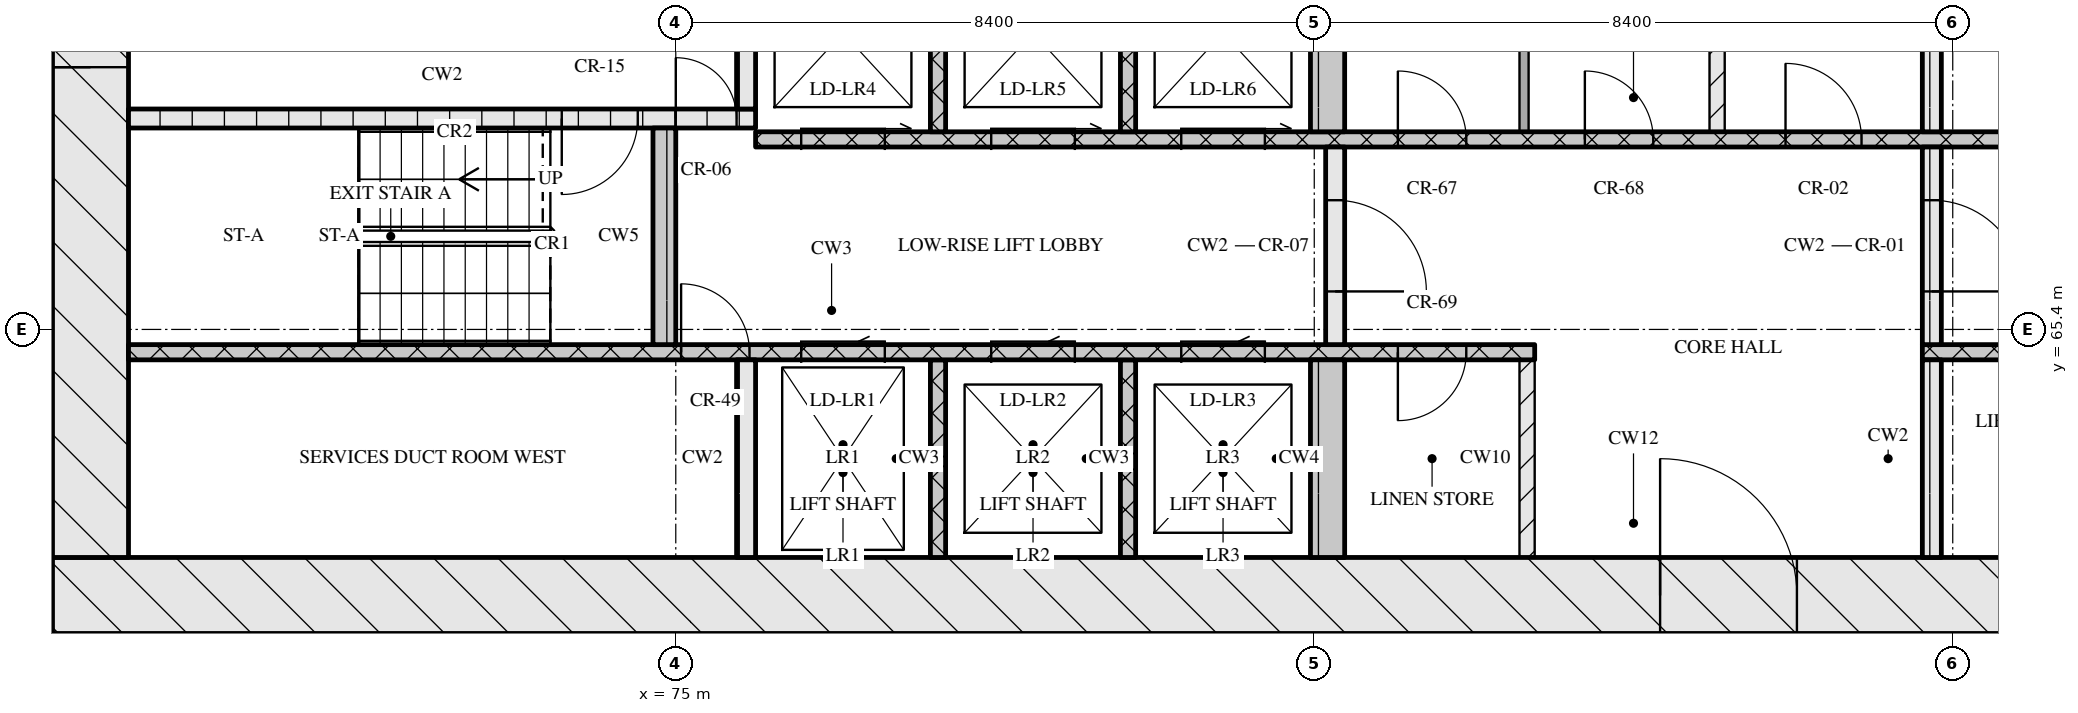
"""IFC4 building model, lengths in metres.
Left out: names, types, materials, properties, quantities, classifications, styles, units other than length and angle.
Written with IfcOpenShell. Run it as: python <this file> out.ifc"""

import sys

from ifc_helpers import new_model, si_unit, direction, frame, frame_2d, origin, place, context, subcontext, project, spatial, rectangle, extrude, element, fill, save


model = new_model("IFC4")
c1 = context("Model", 3, precision=1e-05, world=origin(), true_north=direction((0.0, 1.0)))
c2 = subcontext(c1, "Body", "Model", "MODEL_VIEW")
j1 = project(units=[si_unit("LENGTHUNIT", "METRE"), si_unit("PLANEANGLEUNIT", "RADIAN")], contexts=[c1])
p1 = place(None, origin())
s1 = spatial("IfcSite", under=j1, at=p1, CompositionType="ELEMENT")
p2 = place(p1, origin())
s2 = spatial("IfcBuilding", under=s1, at=p2, CompositionType="ELEMENT")
p3 = place(p2, frame((0.0, 0.0, 131.25)))
s3 = spatial("IfcBuildingStorey", under=s2, at=p3, CompositionType="ELEMENT", Elevation=131.25)
p4 = place(p3, frame((66.8, 61.9, 0.0), z_axis=(0.0, 0.0, 1.0), x_axis=(1.0, 0.0, 0.0)))
e1 = element("IfcWall", 1, at=p4, inside=s3, PredefinedType="SOLIDWALL", context=c2, shape_type="SweptSolid", body=[
    extrude(rectangle(XDim=41.6, YDim=1.0, at=frame_2d((20.8, 0.0))), origin(), (0.0, 0.0, 1.0), 3.32),
])
p5 = place(p4, frame((21.15, 0.0, 0.0)))
e2 = element("IfcOpeningElement", 2, at=p5, cuts=e1, PredefinedType="OPENING", context=c2, shape_type="SweptSolid", body=[
    extrude(rectangle(XDim=1.8, YDim=2.1, at=frame_2d((0.9, 1.05))), frame((0.0, 0.51, 0.0), z_axis=(0.0, -1.0, 0.0), x_axis=(1.0, 0.0, 0.0)), (0.0, 0.0, 1.0), 1.02),
])
p6 = place(p3, frame((67.3, 62.4, 0.0), z_axis=(0.0, 0.0, 1.0), x_axis=(0.0, 1.0, 0.0)))
e3 = element("IfcWall", 3, at=p6, inside=s3, PredefinedType="SOLIDWALL", context=c2, shape_type="SweptSolid", body=[
    extrude(rectangle(XDim=12.0, YDim=1.0, at=frame_2d((6.0, 0.0))), origin(), (0.0, 0.0, 1.0), 3.32),
])
p7 = place(p6, frame((6.45, 0.0, 0.0)))
e4 = element("IfcOpeningElement", 4, at=p7, cuts=e3, PredefinedType="OPENING", context=c2, shape_type="SweptSolid", body=[
    extrude(rectangle(XDim=1.2, YDim=2.1, at=frame_2d((0.6, 1.05))), frame((0.0, 0.51, 0.0), z_axis=(0.0, -1.0, 0.0), x_axis=(1.0, 0.0, 0.0)), (0.0, 0.0, 1.0), 1.02),
])
p8 = place(p3, frame((75.925, 62.4, 0.0), z_axis=(0.0, 0.0, 1.0), x_axis=(0.0, 1.0, 0.0)))
e5 = element("IfcWall", 5, at=p8, inside=s3, PredefinedType="SOLIDWALL", context=c2, shape_type="SweptSolid", body=[
    extrude(rectangle(XDim=2.6, YDim=0.25, at=frame_2d((1.3, 0.0))), origin(), (0.0, 0.0, 1.0), 3.32),
])
for number, where, z_axis, x_axis in (
    (6, (78.45, 62.4, 0.0), (0.0, 0.0, 1.0), (0.0, 1.0, 0.0)),
    (7, (80.95, 62.4, 0.0), (0.0, 0.0, 1.0), (0.0, 1.0, 0.0)),
):
    element("IfcWall", number, at=place(p3, frame(where, z_axis=z_axis, x_axis=x_axis)), inside=s3, PredefinedType="SOLIDWALL", context=c2, shape_type="SweptSolid", body=[
        extrude(rectangle(XDim=2.6, YDim=0.2, at=frame_2d((1.3, 0.0))), origin(), (0.0, 0.0, 1.0), 3.32),
    ])
p9 = place(p3, frame((83.575, 62.4, 0.0), z_axis=(0.0, 0.0, 1.0), x_axis=(0.0, 1.0, 0.0)))
e8 = element("IfcWall", 8, at=p9, inside=s3, PredefinedType="SOLIDWALL", context=c2, shape_type="SweptSolid", body=[
    extrude(rectangle(XDim=2.6, YDim=0.45, at=frame_2d((1.3, 0.0))), origin(), (0.0, 0.0, 1.0), 3.32),
])
p10 = place(p3, frame((86.2, 62.4, 0.0), z_axis=(0.0, 0.0, 1.0), x_axis=(0.0, 1.0, 0.0)))
e9 = element("IfcWall", 9, at=p10, inside=s3, PredefinedType="PARTITIONING", context=c2, shape_type="SweptSolid", body=[
    extrude(rectangle(XDim=2.6, YDim=0.2, at=frame_2d((1.3, 0.0))), origin(), (0.0, 0.0, 1.0), 3.32),
])
p11 = place(p3, frame((91.525, 62.4, 0.0), z_axis=(0.0, 0.0, 1.0), x_axis=(0.0, 1.0, 0.0)))
e10 = element("IfcWall", 10, at=p11, inside=s3, PredefinedType="SOLIDWALL", context=c2, shape_type="SweptSolid", body=[
    extrude(rectangle(XDim=2.6, YDim=0.25, at=frame_2d((1.3, 0.0))), origin(), (0.0, 0.0, 1.0), 3.32),
])
p12 = place(p3, frame((67.8, 65.1, 0.0), z_axis=(0.0, 0.0, 1.0), x_axis=(1.0, 0.0, 0.0)))
e11 = element("IfcWall", 11, at=p12, inside=s3, PredefinedType="SOLIDWALL", context=c2, shape_type="SweptSolid", body=[
    extrude(rectangle(XDim=18.5, YDim=0.2, at=frame_2d((9.25, 0.0))), origin(), (0.0, 0.0, 1.0), 3.32),
])
p13 = place(p12, frame((7.27, 0.0, 0.0)))
e12 = element("IfcOpeningElement", 12, at=p13, cuts=e11, PredefinedType="OPENING", context=c2, shape_type="SweptSolid", body=[
    extrude(rectangle(XDim=0.9, YDim=2.1, at=frame_2d((0.45, 1.05))), frame((0.0, 0.11, 0.0), z_axis=(0.0, -1.0, 0.0), x_axis=(1.0, 0.0, 0.0)), (0.0, 0.0, 1.0), 0.22),
])
p14 = place(p12, frame((8.85, 0.0, 0.0)))
e13 = element("IfcOpeningElement", 13, at=p14, cuts=e11, PredefinedType="OPENING", context=c2, shape_type="SweptSolid", body=[
    extrude(rectangle(XDim=1.1, YDim=2.1, at=frame_2d((0.55, 1.05))), frame((0.0, 0.11, 0.0), z_axis=(0.0, -1.0, 0.0), x_axis=(1.0, 0.0, 0.0)), (0.0, 0.0, 1.0), 0.22),
])
p15 = place(p12, frame((11.35, 0.0, 0.0)))
e14 = element("IfcOpeningElement", 14, at=p15, cuts=e11, PredefinedType="OPENING", context=c2, shape_type="SweptSolid", body=[
    extrude(rectangle(XDim=1.1, YDim=2.1, at=frame_2d((0.55, 1.05))), frame((0.0, 0.11, 0.0), z_axis=(0.0, -1.0, 0.0), x_axis=(1.0, 0.0, 0.0)), (0.0, 0.0, 1.0), 0.22),
])
p16 = place(p12, frame((13.85, 0.0, 0.0)))
e15 = element("IfcOpeningElement", 15, at=p16, cuts=e11, PredefinedType="OPENING", context=c2, shape_type="SweptSolid", body=[
    extrude(rectangle(XDim=1.1, YDim=2.1, at=frame_2d((0.55, 1.05))), frame((0.0, 0.11, 0.0), z_axis=(0.0, -1.0, 0.0), x_axis=(1.0, 0.0, 0.0)), (0.0, 0.0, 1.0), 0.22),
])
p17 = place(p12, frame((16.7, 0.0, 0.0)))
e16 = element("IfcOpeningElement", 16, at=p17, cuts=e11, PredefinedType="OPENING", context=c2, shape_type="SweptSolid", body=[
    extrude(rectangle(XDim=0.9, YDim=2.1, at=frame_2d((0.45, 1.05))), frame((0.0, 0.11, 0.0), z_axis=(0.0, -1.0, 0.0), x_axis=(1.0, 0.0, 0.0)), (0.0, 0.0, 1.0), 0.22),
])
p18 = place(p3, frame((91.4, 65.1, 0.0), z_axis=(0.0, 0.0, 1.0), x_axis=(1.0, 0.0, 0.0)))
e17 = element("IfcWall", 17, at=p18, inside=s3, PredefinedType="SOLIDWALL", context=c2, shape_type="SweptSolid", body=[
    extrude(rectangle(XDim=16.0, YDim=0.2, at=frame_2d((8.0, 0.0))), origin(), (0.0, 0.0, 1.0), 3.32),
])
p19 = place(p18, frame((7.83, 0.0, 0.0)))
e18 = element("IfcOpeningElement", 18, at=p19, cuts=e17, PredefinedType="OPENING", context=c2, shape_type="SweptSolid", body=[
    extrude(rectangle(XDim=0.9, YDim=2.1, at=frame_2d((0.45, 1.05))), frame((0.0, 0.11, 0.0), z_axis=(0.0, -1.0, 0.0), x_axis=(1.0, 0.0, 0.0)), (0.0, 0.0, 1.0), 0.22),
])
p20 = place(p3, frame((74.85, 65.2, 0.0), z_axis=(0.0, 0.0, 1.0), x_axis=(0.0, 1.0, 0.0)))
e19 = element("IfcWall", 19, at=p20, inside=s3, PredefinedType="SOLIDWALL", context=c2, shape_type="SweptSolid", body=[
    extrude(rectangle(XDim=2.85, YDim=0.3, at=frame_2d((1.425, 0.0))), origin(), (0.0, 0.0, 1.0), 3.32),
])
p21 = place(p3, frame((83.675, 65.2, 0.0), z_axis=(0.0, 0.0, 1.0), x_axis=(0.0, 1.0, 0.0)))
e20 = element("IfcWall", 20, at=p21, inside=s3, PredefinedType="SOLIDWALL", context=c2, shape_type="SweptSolid", body=[
    extrude(rectangle(XDim=2.6, YDim=0.25, at=frame_2d((1.3, 0.0))), origin(), (0.0, 0.0, 1.0), 3.32),
])
p22 = place(p21, frame((0.7, 0.0, 0.0)))
e21 = element("IfcOpeningElement", 21, at=p22, cuts=e20, PredefinedType="OPENING", context=c2, shape_type="SweptSolid", body=[
    extrude(rectangle(XDim=1.2, YDim=2.1, at=frame_2d((0.6, 1.05))), frame((0.0, 0.135, 0.0), z_axis=(0.0, -1.0, 0.0), x_axis=(1.0, 0.0, 0.0)), (0.0, 0.0, 1.0), 0.27),
])
p23 = place(p3, frame((91.525, 65.2, 0.0), z_axis=(0.0, 0.0, 1.0), x_axis=(0.0, 1.0, 0.0)))
e22 = element("IfcWall", 22, at=p23, inside=s3, PredefinedType="SOLIDWALL", context=c2, shape_type="SweptSolid", body=[
    extrude(rectangle(XDim=2.6, YDim=0.25, at=frame_2d((1.3, 0.0))), origin(), (0.0, 0.0, 1.0), 3.32),
])
p24 = place(p23, frame((0.7, 0.0, 0.0)))
e23 = element("IfcOpeningElement", 23, at=p24, cuts=e22, PredefinedType="OPENING", context=c2, shape_type="SweptSolid", body=[
    extrude(rectangle(XDim=1.2, YDim=2.1, at=frame_2d((0.6, 1.05))), frame((0.0, 0.135, 0.0), z_axis=(0.0, -1.0, 0.0), x_axis=(1.0, 0.0, 0.0)), (0.0, 0.0, 1.0), 0.27),
])
p25 = place(p3, frame((76.05, 67.9, 0.0), z_axis=(0.0, 0.0, 1.0), x_axis=(1.0, 0.0, 0.0)))
e24 = element("IfcWall", 24, at=p25, inside=s3, PredefinedType="SOLIDWALL", context=c2, shape_type="SweptSolid", body=[
    extrude(rectangle(XDim=23.1, YDim=0.2, at=frame_2d((11.55, 0.0))), origin(), (0.0, 0.0, 1.0), 3.32),
])
p26 = place(p25, frame((0.6, 0.0, 0.0)))
e25 = element("IfcOpeningElement", 25, at=p26, cuts=e24, PredefinedType="OPENING", context=c2, shape_type="SweptSolid", body=[
    extrude(rectangle(XDim=1.1, YDim=2.1, at=frame_2d((0.55, 1.05))), frame((0.0, 0.11, 0.0), z_axis=(0.0, -1.0, 0.0), x_axis=(1.0, 0.0, 0.0)), (0.0, 0.0, 1.0), 0.22),
])
p27 = place(p25, frame((3.1, 0.0, 0.0)))
e26 = element("IfcOpeningElement", 26, at=p27, cuts=e24, PredefinedType="OPENING", context=c2, shape_type="SweptSolid", body=[
    extrude(rectangle(XDim=1.1, YDim=2.1, at=frame_2d((0.55, 1.05))), frame((0.0, 0.11, 0.0), z_axis=(0.0, -1.0, 0.0), x_axis=(1.0, 0.0, 0.0)), (0.0, 0.0, 1.0), 0.22),
])
p28 = place(p25, frame((5.6, 0.0, 0.0)))
e27 = element("IfcOpeningElement", 27, at=p28, cuts=e24, PredefinedType="OPENING", context=c2, shape_type="SweptSolid", body=[
    extrude(rectangle(XDim=1.1, YDim=2.1, at=frame_2d((0.55, 1.05))), frame((0.0, 0.11, 0.0), z_axis=(0.0, -1.0, 0.0), x_axis=(1.0, 0.0, 0.0)), (0.0, 0.0, 1.0), 0.22),
])
p29 = place(p25, frame((8.45, 0.0, 0.0)))
e28 = element("IfcOpeningElement", 28, at=p29, cuts=e24, PredefinedType="OPENING", context=c2, shape_type="SweptSolid", body=[
    extrude(rectangle(XDim=0.9, YDim=2.1, at=frame_2d((0.45, 1.05))), frame((0.0, 0.11, 0.0), z_axis=(0.0, -1.0, 0.0), x_axis=(1.0, 0.0, 0.0)), (0.0, 0.0, 1.0), 0.22),
])
p30 = place(p25, frame((10.91, 0.0, 0.0)))
e29 = element("IfcOpeningElement", 29, at=p30, cuts=e24, PredefinedType="OPENING", context=c2, shape_type="SweptSolid", body=[
    extrude(rectangle(XDim=0.9, YDim=2.1, at=frame_2d((0.45, 1.05))), frame((0.0, 0.11, 0.0), z_axis=(0.0, -1.0, 0.0), x_axis=(1.0, 0.0, 0.0)), (0.0, 0.0, 1.0), 0.22),
])
p31 = place(p25, frame((13.55, 0.0, 0.0)))
e30 = element("IfcOpeningElement", 30, at=p31, cuts=e24, PredefinedType="OPENING", context=c2, shape_type="SweptSolid", body=[
    extrude(rectangle(XDim=1.0, YDim=2.1, at=frame_2d((0.5, 1.05))), frame((0.0, 0.11, 0.0), z_axis=(0.0, -1.0, 0.0), x_axis=(1.0, 0.0, 0.0)), (0.0, 0.0, 1.0), 0.22),
])
for number, where, z_axis, x_axis in (
    (31, (78.45, 68.0, 0.0), (0.0, 0.0, 1.0), (0.0, 1.0, 0.0)),
    (32, (80.95, 68.0, 0.0), (0.0, 0.0, 1.0), (0.0, 1.0, 0.0)),
):
    element("IfcWall", number, at=place(p3, frame(where, z_axis=z_axis, x_axis=x_axis)), inside=s3, PredefinedType="SOLIDWALL", context=c2, shape_type="SweptSolid", body=[
        extrude(rectangle(XDim=2.6, YDim=0.2, at=frame_2d((1.3, 0.0))), origin(), (0.0, 0.0, 1.0), 3.32),
    ])
p32 = place(p3, frame((83.575, 68.0, 0.0), z_axis=(0.0, 0.0, 1.0), x_axis=(0.0, 1.0, 0.0)))
e33 = element("IfcWall", 33, at=p32, inside=s3, PredefinedType="SOLIDWALL", context=c2, shape_type="SweptSolid", body=[
    extrude(rectangle(XDim=2.6, YDim=0.45, at=frame_2d((1.3, 0.0))), origin(), (0.0, 0.0, 1.0), 3.32),
])
p33 = place(p3, frame((86.16, 68.0, 0.0), z_axis=(0.0, 0.0, 1.0), x_axis=(0.0, 1.0, 0.0)))
e34 = element("IfcWall", 34, at=p33, inside=s3, PredefinedType="PARTITIONING", context=c2, shape_type="SweptSolid", body=[
    extrude(rectangle(XDim=2.6, YDim=0.12, at=frame_2d((1.3, 0.0))), origin(), (0.0, 0.0, 1.0), 3.32),
])
p34 = place(p3, frame((88.7, 68.0, 0.0), z_axis=(0.0, 0.0, 1.0), x_axis=(0.0, 1.0, 0.0)))
e35 = element("IfcWall", 35, at=p34, inside=s3, PredefinedType="PARTITIONING", context=c2, shape_type="SweptSolid", body=[
    extrude(rectangle(XDim=2.6, YDim=0.2, at=frame_2d((1.3, 0.0))), origin(), (0.0, 0.0, 1.0), 3.32),
])
p35 = place(p3, frame((91.525, 68.0, 0.0), z_axis=(0.0, 0.0, 1.0), x_axis=(0.0, 1.0, 0.0)))
e36 = element("IfcWall", 36, at=p35, inside=s3, PredefinedType="SOLIDWALL", context=c2, shape_type="SweptSolid", body=[
    extrude(rectangle(XDim=2.6, YDim=0.25, at=frame_2d((1.3, 0.0))), origin(), (0.0, 0.0, 1.0), 3.32),
])
p36 = place(p3, frame((67.8, 68.175, 0.0), z_axis=(0.0, 0.0, 1.0), x_axis=(1.0, 0.0, 0.0)))
e37 = element("IfcWall", 37, at=p36, inside=s3, PredefinedType="SOLIDWALL", context=c2, shape_type="SweptSolid", body=[
    extrude(rectangle(XDim=8.25, YDim=0.25, at=frame_2d((4.125, 0.0))), origin(), (0.0, 0.0, 1.0), 3.32),
])
p37 = place(p36, frame((5.7, 0.0, 0.0)))
e38 = element("IfcOpeningElement", 38, at=p37, cuts=e37, PredefinedType="OPENING", context=c2, shape_type="SweptSolid", body=[
    extrude(rectangle(XDim=1.0, YDim=2.1, at=frame_2d((0.5, 1.05))), frame((0.0, 0.135, 0.0), z_axis=(0.0, -1.0, 0.0), x_axis=(1.0, 0.0, 0.0)), (0.0, 0.0, 1.0), 0.27),
])
p38 = place(p36, frame((7.2, 0.0, 0.0)))
e39 = element("IfcOpeningElement", 39, at=p38, cuts=e37, PredefinedType="OPENING", context=c2, shape_type="SweptSolid", body=[
    extrude(rectangle(XDim=0.8, YDim=2.1, at=frame_2d((0.4, 1.05))), frame((0.0, 0.135, 0.0), z_axis=(0.0, -1.0, 0.0), x_axis=(1.0, 0.0, 0.0)), (0.0, 0.0, 1.0), 0.27),
])
p39 = place(p3, frame((75.925, 68.3, 0.0), z_axis=(0.0, 0.0, 1.0), x_axis=(0.0, 1.0, 0.0)))
e40 = element("IfcWall", 40, at=p39, inside=s3, PredefinedType="SOLIDWALL", context=c2, shape_type="SweptSolid", body=[
    extrude(rectangle(XDim=2.3, YDim=0.25, at=frame_2d((1.15, 0.0))), origin(), (0.0, 0.0, 1.0), 3.32),
])
p40 = place(p5, origin())
e41 = element("IfcDoor", 41, at=p40, inside=s3, OperationType="DOUBLE_DOOR_SINGLE_SWING", PredefinedType="DOOR", context=c2, shape_type="SweptSolid", body=[
    extrude(rectangle(XDim=1.8, YDim=2.1, at=frame_2d((0.9, 1.05))), frame((0.0, 0.025, 0.0), z_axis=(0.0, -1.0, 0.0), x_axis=(1.0, 0.0, 0.0)), (0.0, 0.0, 1.0), 0.05),
])
fill(e2, e41)
p41 = place(p13, origin())
e42 = element("IfcDoor", 42, at=p41, inside=s3, OperationType="SINGLE_SWING_LEFT", PredefinedType="DOOR", context=c2, shape_type="SweptSolid", body=[
    extrude(rectangle(XDim=0.9, YDim=2.1, at=frame_2d((0.45, 1.05))), frame((0.0, 0.025, 0.0), z_axis=(0.0, -1.0, 0.0), x_axis=(1.0, 0.0, 0.0)), (0.0, 0.0, 1.0), 0.05),
])
fill(e12, e42)
p42 = place(p14, origin())
e43 = element("IfcDoor", 43, at=p42, inside=s3, OperationType="SLIDING_TO_LEFT", PredefinedType="DOOR", context=c2, shape_type="SweptSolid", body=[
    extrude(rectangle(XDim=1.1, YDim=2.1, at=frame_2d((0.55, 1.05))), frame((0.0, 0.025, 0.0), z_axis=(0.0, -1.0, 0.0), x_axis=(1.0, 0.0, 0.0)), (0.0, 0.0, 1.0), 0.05),
])
fill(e13, e43)
p43 = place(p15, origin())
e44 = element("IfcDoor", 44, at=p43, inside=s3, OperationType="SLIDING_TO_LEFT", PredefinedType="DOOR", context=c2, shape_type="SweptSolid", body=[
    extrude(rectangle(XDim=1.1, YDim=2.1, at=frame_2d((0.55, 1.05))), frame((0.0, 0.025, 0.0), z_axis=(0.0, -1.0, 0.0), x_axis=(1.0, 0.0, 0.0)), (0.0, 0.0, 1.0), 0.05),
])
fill(e14, e44)
p44 = place(p16, origin())
e45 = element("IfcDoor", 45, at=p44, inside=s3, OperationType="SLIDING_TO_LEFT", PredefinedType="DOOR", context=c2, shape_type="SweptSolid", body=[
    extrude(rectangle(XDim=1.1, YDim=2.1, at=frame_2d((0.55, 1.05))), frame((0.0, 0.025, 0.0), z_axis=(0.0, -1.0, 0.0), x_axis=(1.0, 0.0, 0.0)), (0.0, 0.0, 1.0), 0.05),
])
fill(e15, e45)
p45 = place(p17, origin())
e46 = element("IfcDoor", 46, at=p45, inside=s3, OperationType="SINGLE_SWING_RIGHT", PredefinedType="DOOR", context=c2, shape_type="SweptSolid", body=[
    extrude(rectangle(XDim=0.9, YDim=2.1, at=frame_2d((0.45, 1.05))), frame((0.0, 0.025, 0.0), z_axis=(0.0, -1.0, 0.0), x_axis=(1.0, 0.0, 0.0)), (0.0, 0.0, 1.0), 0.05),
])
fill(e16, e46)
p46 = place(p22, origin())
e47 = element("IfcDoor", 47, at=p46, inside=s3, OperationType="SINGLE_SWING_RIGHT", PredefinedType="DOOR", context=c2, shape_type="SweptSolid", body=[
    extrude(rectangle(XDim=1.2, YDim=2.1, at=frame_2d((0.6, 1.05))), frame((0.0, 0.025, 0.0), z_axis=(0.0, -1.0, 0.0), x_axis=(1.0, 0.0, 0.0)), (0.0, 0.0, 1.0), 0.05),
])
fill(e21, e47)
p47 = place(p24, origin())
e48 = element("IfcDoor", 48, at=p47, inside=s3, OperationType="SINGLE_SWING_RIGHT", PredefinedType="DOOR", context=c2, shape_type="SweptSolid", body=[
    extrude(rectangle(XDim=1.2, YDim=2.1, at=frame_2d((0.6, 1.05))), frame((0.0, 0.025, 0.0), z_axis=(0.0, -1.0, 0.0), x_axis=(1.0, 0.0, 0.0)), (0.0, 0.0, 1.0), 0.05),
])
fill(e23, e48)
p48 = place(p26, origin())
e49 = element("IfcDoor", 49, at=p48, inside=s3, OperationType="SLIDING_TO_RIGHT", PredefinedType="DOOR", context=c2, shape_type="SweptSolid", body=[
    extrude(rectangle(XDim=1.1, YDim=2.1, at=frame_2d((0.55, 1.05))), frame((0.0, 0.025, 0.0), z_axis=(0.0, -1.0, 0.0), x_axis=(1.0, 0.0, 0.0)), (0.0, 0.0, 1.0), 0.05),
])
fill(e25, e49)
p49 = place(p27, origin())
e50 = element("IfcDoor", 50, at=p49, inside=s3, OperationType="SLIDING_TO_RIGHT", PredefinedType="DOOR", context=c2, shape_type="SweptSolid", body=[
    extrude(rectangle(XDim=1.1, YDim=2.1, at=frame_2d((0.55, 1.05))), frame((0.0, 0.025, 0.0), z_axis=(0.0, -1.0, 0.0), x_axis=(1.0, 0.0, 0.0)), (0.0, 0.0, 1.0), 0.05),
])
fill(e26, e50)
p50 = place(p28, origin())
e51 = element("IfcDoor", 51, at=p50, inside=s3, OperationType="SLIDING_TO_RIGHT", PredefinedType="DOOR", context=c2, shape_type="SweptSolid", body=[
    extrude(rectangle(XDim=1.1, YDim=2.1, at=frame_2d((0.55, 1.05))), frame((0.0, 0.025, 0.0), z_axis=(0.0, -1.0, 0.0), x_axis=(1.0, 0.0, 0.0)), (0.0, 0.0, 1.0), 0.05),
])
fill(e27, e51)
p51 = place(p29, origin())
e52 = element("IfcDoor", 52, at=p51, inside=s3, OperationType="SINGLE_SWING_LEFT", PredefinedType="DOOR", context=c2, shape_type="SweptSolid", body=[
    extrude(rectangle(XDim=0.9, YDim=2.1, at=frame_2d((0.45, 1.05))), frame((0.0, 0.025, 0.0), z_axis=(0.0, -1.0, 0.0), x_axis=(1.0, 0.0, 0.0)), (0.0, 0.0, 1.0), 0.05),
])
fill(e28, e52)
p52 = place(p30, origin())
e53 = element("IfcDoor", 53, at=p52, inside=s3, OperationType="SINGLE_SWING_LEFT", PredefinedType="DOOR", context=c2, shape_type="SweptSolid", body=[
    extrude(rectangle(XDim=0.9, YDim=2.1, at=frame_2d((0.45, 1.05))), frame((0.0, 0.025, 0.0), z_axis=(0.0, -1.0, 0.0), x_axis=(1.0, 0.0, 0.0)), (0.0, 0.0, 1.0), 0.05),
])
fill(e29, e53)
p53 = place(p31, origin())
e54 = element("IfcDoor", 54, at=p53, inside=s3, OperationType="SINGLE_SWING_LEFT", PredefinedType="DOOR", context=c2, shape_type="SweptSolid", body=[
    extrude(rectangle(XDim=1.0, YDim=2.1, at=frame_2d((0.5, 1.05))), frame((0.0, 0.025, 0.0), z_axis=(0.0, -1.0, 0.0), x_axis=(1.0, 0.0, 0.0)), (0.0, 0.0, 1.0), 0.05),
])
fill(e30, e54)
p54 = place(p37, origin())
e55 = element("IfcDoor", 55, at=p54, inside=s3, OperationType="SINGLE_SWING_RIGHT", PredefinedType="DOOR", context=c2, shape_type="SweptSolid", body=[
    extrude(rectangle(XDim=1.0, YDim=2.1, at=frame_2d((0.5, 1.05))), frame((0.0, 0.025, 0.0), z_axis=(0.0, -1.0, 0.0), x_axis=(1.0, 0.0, 0.0)), (0.0, 0.0, 1.0), 0.05),
])
fill(e38, e55)
p55 = place(p38, origin())
e56 = element("IfcDoor", 56, at=p55, inside=s3, OperationType="SINGLE_SWING_LEFT", PredefinedType="DOOR", context=c2, shape_type="SweptSolid", body=[
    extrude(rectangle(XDim=0.8, YDim=2.1, at=frame_2d((0.4, 1.05))), frame((0.0, 0.025, 0.0), z_axis=(0.0, -1.0, 0.0), x_axis=(1.0, 0.0, 0.0)), (0.0, 0.0, 1.0), 0.05),
])
fill(e39, e56)
p56 = place(p7, origin())
e57 = element("IfcDoor", 57, at=p56, inside=s3, OperationType="SINGLE_SWING_LEFT", PredefinedType="DOOR", context=c2, shape_type="SweptSolid", body=[
    extrude(rectangle(XDim=1.2, YDim=2.1, at=frame_2d((0.6, 1.05))), frame((0.0, 0.025, 0.0), z_axis=(0.0, -1.0, 0.0), x_axis=(1.0, 0.0, 0.0)), (0.0, 0.0, 1.0), 0.05),
])
fill(e4, e57)
save(model, sys.argv[1])
